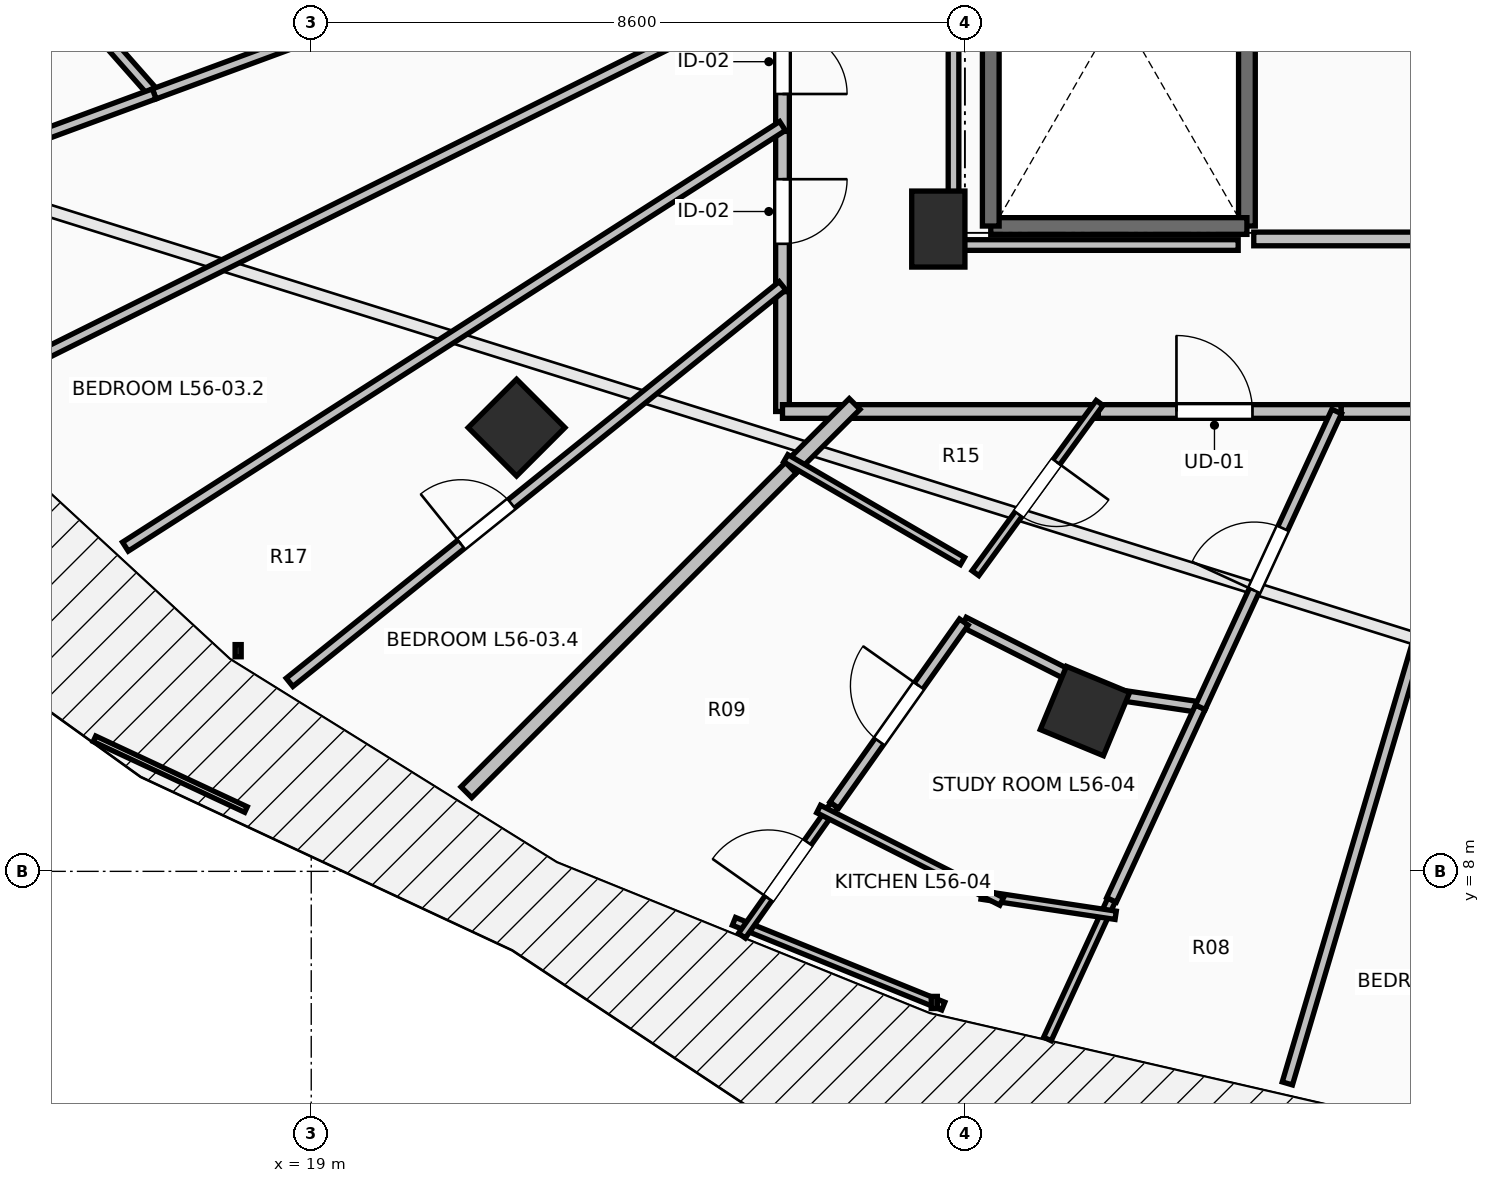
"""IFC4 building model, lengths in metres.
Left out: names, types, materials, properties, quantities, classifications, styles, units other than length and angle.
Written with IfcOpenShell. Run it as: python <this file> out.ifc"""

import sys

from ifc_helpers import new_model, si_unit, direction, frame, frame_2d, origin, origin_2d, place, context, subcontext, project, spatial, rectangle, extrude, element, fill, save


model = new_model("IFC4")
c1 = context("Model", 3, precision=1e-05, world=origin(), true_north=direction((0.0, 1.0)))
c2 = subcontext(c1, "Body", "Model", "MODEL_VIEW")
j1 = project(units=[si_unit("LENGTHUNIT", "METRE"), si_unit("PLANEANGLEUNIT", "RADIAN")], contexts=[c1])
p1 = place(None, origin())
s1 = spatial("IfcSite", under=j1, at=p1, CompositionType="ELEMENT")
p2 = place(p1, origin())
s2 = spatial("IfcBuilding", under=s1, at=p2, CompositionType="ELEMENT")
p3 = place(p2, frame((0.0, 0.0, 207.2)))
s3 = spatial("IfcBuildingStorey", under=s2, at=p3, CompositionType="ELEMENT", Elevation=207.2)
for number, where, z_axis, x_axis in (
    (1, (21.701, 13.838, 0.0), (0.0, 0.0, 1.0), (-0.707, -0.707, 0.0)),
    (2, (29.179, 10.109, 0.0), (0.0, 0.0, 1.0), (-0.383, -0.924, 0.0)),
):
    element("IfcColumn", number, at=place(p3, frame(where, z_axis=z_axis, x_axis=x_axis)), inside=s3, PredefinedType="COLUMN", context=c2, shape_type="SweptSolid", body=[
        extrude(rectangle(XDim=0.9, YDim=0.9, at=origin_2d()), origin(), (0.0, 0.0, 1.0), 3.55),
    ])
p4 = place(p3, frame((27.25, 16.45, 0.0), z_axis=(0.0, 0.0, 1.0), x_axis=(1.0, 0.0, 0.0)))
e3 = element("IfcColumn", 3, at=p4, inside=s3, PredefinedType="PILASTER", context=c2, shape_type="SweptSolid", body=[
    extrude(rectangle(XDim=0.7, YDim=1.0, at=origin_2d()), origin(), (0.0, 0.0, 1.0), 3.55),
])
p5 = place(p3, frame((31.31, 23.91, 0.0), z_axis=(0.0, 0.0, 1.0), x_axis=(0.0, -1.0, 0.0)))
e4 = element("IfcWall", 4, at=p5, inside=s3, PredefinedType="SOLIDWALL", context=c2, shape_type="SweptSolid", body=[
    extrude(rectangle(XDim=7.42, YDim=0.22, at=frame_2d((3.71, 0.0))), origin(), (0.0, 0.0, 1.0), 3.29),
])
p6 = place(p3, frame((31.31, 16.49, 0.0), z_axis=(0.0, 0.0, 1.0), x_axis=(-1.0, 0.0, 0.0)))
e5 = element("IfcWall", 5, at=p6, inside=s3, PredefinedType="SOLIDWALL", context=c2, shape_type="SweptSolid", body=[
    extrude(rectangle(XDim=3.37, YDim=0.22, at=frame_2d((1.685, 0.0))), origin(), (0.0, 0.0, 1.0), 3.29),
])
p7 = place(p3, frame((27.94, 16.49, 0.0), z_axis=(0.0, 0.0, 1.0), x_axis=(0.0, 1.0, 0.0)))
e6 = element("IfcWall", 6, at=p7, inside=s3, PredefinedType="SOLIDWALL", context=c2, shape_type="SweptSolid", body=[
    extrude(rectangle(XDim=7.42, YDim=0.22, at=frame_2d((3.71, 0.0))), origin(), (0.0, 0.0, 1.0), 3.29),
])
p8 = place(p3, frame((31.4, 16.32, 0.0), z_axis=(0.0, 0.0, 1.0), x_axis=(1.0, 0.0, 0.0)))
e7 = element("IfcWall", 7, at=p8, inside=s3, PredefinedType="PARTITIONING", context=c2, shape_type="SweptSolid", body=[
    extrude(rectangle(XDim=7.4, YDim=0.18, at=frame_2d((3.7, 0.0))), origin(), (0.0, 0.0, 1.0), 3.29),
])
p9 = place(p8, frame((3.275, 0.0, 0.0)))
e8 = element("IfcOpeningElement", 8, at=p9, cuts=e7, PredefinedType="OPENING", context=c2, shape_type="SweptSolid", body=[
    extrude(rectangle(XDim=0.85, YDim=2.1, at=frame_2d((0.425, 1.05))), frame((0.0, 0.105, 0.0), z_axis=(0.0, -1.0, 0.0), x_axis=(1.0, 0.0, 0.0)), (0.0, 0.0, 1.0), 0.21),
])
p10 = place(p3, frame((25.2, 19.569, 0.0), z_axis=(0.0, 0.0, 1.0), x_axis=(0.0, -1.0, 0.0)))
e9 = element("IfcWall", 9, at=p10, inside=s3, PredefinedType="PARTITIONING", context=c2, shape_type="SweptSolid", body=[
    extrude(rectangle(XDim=1.834, YDim=0.18, at=frame_2d((0.917, 0.0))), origin(), (0.0, 0.0, 1.0), 3.29),
])
p11 = place(p10, frame((0.492, 0.0, 0.0)))
e10 = element("IfcOpeningElement", 10, at=p11, cuts=e9, PredefinedType="OPENING", context=c2, shape_type="SweptSolid", body=[
    extrude(rectangle(XDim=0.85, YDim=2.1, at=frame_2d((0.425, 1.05))), frame((0.0, 0.105, 0.0), z_axis=(0.0, -1.0, 0.0), x_axis=(1.0, 0.0, 0.0)), (0.0, 0.0, 1.0), 0.21),
])
p12 = place(p3, frame((25.2, 17.735, 0.0), z_axis=(0.0, 0.0, 1.0), x_axis=(0.0, -1.0, 0.0)))
e11 = element("IfcWall", 11, at=p12, inside=s3, PredefinedType="PARTITIONING", context=c2, shape_type="SweptSolid", body=[
    extrude(rectangle(XDim=2.108, YDim=0.18, at=frame_2d((1.054, 0.0))), origin(), (0.0, 0.0, 1.0), 2.482),
])
p13 = place(p12, frame((0.629, 0.0, 0.0)))
e12 = element("IfcOpeningElement", 12, at=p13, cuts=e11, PredefinedType="OPENING", context=c2, shape_type="SweptSolid", body=[
    extrude(rectangle(XDim=0.85, YDim=2.1, at=frame_2d((0.425, 1.05))), frame((0.0, 0.105, 0.0), z_axis=(0.0, -1.0, 0.0), x_axis=(1.0, 0.0, 0.0)), (0.0, 0.0, 1.0), 0.21),
])
p14 = place(p3, frame((25.2, 15.627, 0.0), z_axis=(0.0, 0.0, 1.0), x_axis=(0.0, -1.0, 0.0)))
e13 = element("IfcWall", 13, at=p14, inside=s3, PredefinedType="PARTITIONING", context=c2, shape_type="SweptSolid", body=[
    extrude(rectangle(XDim=1.577, YDim=0.18, at=frame_2d((0.789, 0.0))), origin(), (0.0, 0.0, 1.0), 2.482),
])
p15 = place(p3, frame((25.2, 14.05, 0.0), z_axis=(0.0, 0.0, 1.0), x_axis=(1.0, 0.0, 0.0)))
e14 = element("IfcWall", 14, at=p15, inside=s3, PredefinedType="PARTITIONING", context=c2, shape_type="SweptSolid", body=[
    extrude(rectangle(XDim=0.91, YDim=0.18, at=frame_2d((0.455, 0.0))), origin(), (0.0, 0.0, 1.0), 3.022),
])
p16 = place(p3, frame((29.215, 14.05, 0.0), z_axis=(0.0, 0.0, 1.0), x_axis=(1.0, 0.0, 0.0)))
e15 = element("IfcWall", 15, at=p16, inside=s3, PredefinedType="PARTITIONING", context=c2, shape_type="SweptSolid", body=[
    extrude(rectangle(XDim=3.336, YDim=0.18, at=frame_2d((1.668, 0.0))), origin(), (0.0, 0.0, 1.0), 2.936),
])
p17 = place(p16, frame((1.168, 0.0, 0.0)))
e16 = element("IfcOpeningElement", 16, at=p17, cuts=e15, PredefinedType="OPENING", context=c2, shape_type="SweptSolid", body=[
    extrude(rectangle(XDim=1.0, YDim=2.15, at=frame_2d((0.5, 1.075))), frame((0.0, 0.105, 0.0), z_axis=(0.0, -1.0, 0.0), x_axis=(1.0, 0.0, 0.0)), (0.0, 0.0, 1.0), 0.21),
])
p18 = place(p3, frame((25.97, 14.05, 0.0), z_axis=(0.0, 0.0, 1.0), x_axis=(1.0, 0.0, 0.0)))
e17 = element("IfcWall", 17, at=p18, inside=s3, PredefinedType="PARTITIONING", context=c2, shape_type="SweptSolid", body=[
    extrude(rectangle(XDim=3.385, YDim=0.18, at=frame_2d((1.692, 0.0))), origin(), (0.0, 0.0, 1.0), 2.482),
])
p19 = place(p3, frame((32.551, 14.05, 0.0), z_axis=(0.0, 0.0, 1.0), x_axis=(1.0, 0.0, 0.0)))
e18 = element("IfcWall", 18, at=p19, inside=s3, PredefinedType="PARTITIONING", context=c2, shape_type="SweptSolid", body=[
    extrude(rectangle(XDim=1.969, YDim=0.18, at=frame_2d((0.984, 0.0))), origin(), (0.0, 0.0, 1.0), 2.936),
])
p20 = place(p3, frame((16.123, 19.147, 0.0), z_axis=(0.0, 0.0, 1.0), x_axis=(0.66171386468, -0.749756467988, 0.0)))
e19 = element("IfcWall", 19, at=p20, inside=s3, PredefinedType="PARTITIONING", context=c2, shape_type="SweptSolid", body=[
    extrude(rectangle(XDim=1.226, YDim=0.14, at=frame_2d((0.613, 0.0))), origin(), (0.0, 0.0, 1.0), 3.29),
])
p21 = place(p3, frame((16.934, 18.228, 0.0), z_axis=(0.0, 0.0, 1.0), x_axis=(0.938168899516, 0.34617786755, 0.0)))
e20 = element("IfcWall", 20, at=p21, inside=s3, PredefinedType="PARTITIONING", context=c2, shape_type="SweptSolid", body=[
    extrude(rectangle(XDim=8.811, YDim=0.14, at=frame_2d((4.405, 0.0))), origin(), (0.0, 0.0, 1.0), 2.482),
])
p22 = place(p21, frame((3.955, 0.0, 0.0)))
e21 = element("IfcOpeningElement", 21, at=p22, cuts=e20, PredefinedType="OPENING", context=c2, shape_type="SweptSolid", body=[
    extrude(rectangle(XDim=0.9, YDim=2.1, at=frame_2d((0.45, 1.05))), frame((0.0, 0.085, 0.0), z_axis=(0.0, -1.0, 0.0), x_axis=(1.0, 0.0, 0.0)), (0.0, 0.0, 1.0), 0.17),
])
p23 = place(p3, frame((14.788, 17.436, 0.0), z_axis=(0.0, 0.0, 1.0), x_axis=(0.938171690747, 0.346170303003, 0.0)))
e22 = element("IfcWall", 22, at=p23, inside=s3, PredefinedType="PARTITIONING", context=c2, shape_type="SweptSolid", body=[
    extrude(rectangle(XDim=2.287, YDim=0.14, at=frame_2d((1.144, 0.0))), origin(), (0.0, 0.0, 1.0), 3.29),
])
p24 = place(p3, frame((14.428, 14.28, 0.0), z_axis=(0.0, 0.0, 1.0), x_axis=(0.895423439435, 0.44521552546, 0.0)))
e23 = element("IfcWall", 23, at=p24, inside=s3, PredefinedType="PARTITIONING", context=c2, shape_type="SweptSolid", body=[
    extrude(rectangle(XDim=12.03, YDim=0.14, at=frame_2d((6.015, 0.0))), origin(), (0.0, 0.0, 1.0), 2.482),
])
p25 = place(p3, frame((16.555, 12.272, 0.0), z_axis=(0.0, 0.0, 1.0), x_axis=(0.842221721565, 0.539131312135, 0.0)))
e24 = element("IfcWall", 24, at=p25, inside=s3, PredefinedType="PARTITIONING", context=c2, shape_type="SweptSolid", body=[
    extrude(rectangle(XDim=10.265, YDim=0.14, at=frame_2d((5.132, 0.0))), origin(), (0.0, 0.0, 1.0), 2.482),
])
p26 = place(p3, frame((18.715, 10.487, 0.0), z_axis=(0.0, 0.0, 1.0), x_axis=(0.779157389419, 0.626828335762, 0.0)))
e25 = element("IfcWall", 25, at=p26, inside=s3, PredefinedType="PARTITIONING", context=c2, shape_type="SweptSolid", body=[
    extrude(rectangle(XDim=8.323, YDim=0.14, at=frame_2d((4.162, 0.0))), origin(), (0.0, 0.0, 1.0), 2.482),
])
p27 = place(p26, frame((2.896, 0.0, 0.0)))
e26 = element("IfcOpeningElement", 26, at=p27, cuts=e25, PredefinedType="OPENING", context=c2, shape_type="SweptSolid", body=[
    extrude(rectangle(XDim=0.85, YDim=2.1, at=frame_2d((0.425, 1.05))), frame((0.0, 0.085, 0.0), z_axis=(0.0, -1.0, 0.0), x_axis=(1.0, 0.0, 0.0)), (0.0, 0.0, 1.0), 0.17),
])
p28 = place(p3, frame((21.041, 9.041, 0.0), z_axis=(0.0, 0.0, 1.0), x_axis=(0.707106781187, 0.707106781187, 0.0)))
e27 = element("IfcWall", 27, at=p28, inside=s3, PredefinedType="PARTITIONING", context=c2, shape_type="SweptSolid", body=[
    extrude(rectangle(XDim=6.176, YDim=0.2, at=frame_2d((3.088, 0.0))), origin(), (0.0, 0.0, 1.0), 2.824),
])
p29 = place(p3, frame((25.309, 13.309, 0.0), z_axis=(0.0, 0.0, 1.0), x_axis=(0.707106781187, 0.707106781187, 0.0)))
e28 = element("IfcWall", 28, at=p29, inside=s3, PredefinedType="PARTITIONING", context=c2, shape_type="SweptSolid", body=[
    extrude(rectangle(XDim=1.188, YDim=0.2, at=frame_2d((0.594, 0.0))), origin(), (0.0, 0.0, 1.0), 3.022),
])
p30 = place(p3, frame((29.372, 14.163, 0.0), z_axis=(0.0, 0.0, 1.0), x_axis=(-0.589066743954, -0.808084383693, 0.0)))
e29 = element("IfcWall", 29, at=p30, inside=s3, PredefinedType="PARTITIONING", context=c2, shape_type="SweptSolid", body=[
    extrude(rectangle(XDim=2.772, YDim=0.11, at=frame_2d((1.386, 0.0))), origin(), (0.0, 0.0, 1.0), 2.482),
])
p31 = place(p30, frame((0.961, 0.0, 0.0)))
e30 = element("IfcOpeningElement", 30, at=p31, cuts=e29, PredefinedType="OPENING", context=c2, shape_type="SweptSolid", body=[
    extrude(rectangle(XDim=0.85, YDim=2.1, at=frame_2d((0.425, 1.05))), frame((0.0, 0.07, 0.0), z_axis=(0.0, -1.0, 0.0), x_axis=(1.0, 0.0, 0.0)), (0.0, 0.0, 1.0), 0.14),
])
p32 = place(p3, frame((27.568, 12.083, 0.0), z_axis=(0.0, 0.0, 1.0), x_axis=(-0.864515441931, 0.502606258082, 0.0)))
e31 = element("IfcWall", 31, at=p32, inside=s3, PredefinedType="PARTITIONING", context=c2, shape_type="SweptSolid", body=[
    extrude(rectangle(XDim=2.69, YDim=0.11, at=frame_2d((1.345, 0.0))), origin(), (0.0, 0.0, 1.0), 3.29),
])
p33 = place(p3, frame((29.529, 7.624, 0.0), z_axis=(0.0, 0.0, 1.0), x_axis=(-0.418673802252, -0.908136689771, 0.0)))
e32 = element("IfcWall", 32, at=p33, inside=s3, PredefinedType="PARTITIONING", context=c2, shape_type="SweptSolid", body=[
    extrude(rectangle(XDim=2.014, YDim=0.11, at=frame_2d((1.007, 0.0))), origin(), (0.0, 0.0, 1.0), 3.29),
])
p34 = place(p3, frame((24.561, 7.343, 0.0), z_axis=(0.0, 0.0, 1.0), x_axis=(0.926858319785, -0.375411314487, 0.0)))
e33 = element("IfcWall", 33, at=p34, inside=s3, PredefinedType="PARTITIONING", context=c2, shape_type="SweptSolid", body=[
    extrude(rectangle(XDim=2.971, YDim=0.11, at=frame_2d((1.485, 0.0))), origin(), (0.0, 0.0, 1.0), 3.29),
])
p35 = place(p3, frame((24.666, 7.154, 0.0), z_axis=(0.0, 0.0, 1.0), x_axis=(0.577389248155, 0.816469017241, 0.0)))
e34 = element("IfcWall", 34, at=p35, inside=s3, PredefinedType="PARTITIONING", context=c2, shape_type="SweptSolid", body=[
    extrude(rectangle(XDim=2.104, YDim=0.11, at=frame_2d((1.052, 0.0))), origin(), (0.0, 0.0, 1.0), 3.29),
])
p36 = place(p35, frame((0.602, 0.0, 0.0)))
e35 = element("IfcOpeningElement", 35, at=p36, cuts=e34, PredefinedType="OPENING", context=c2, shape_type="SweptSolid", body=[
    extrude(rectangle(XDim=0.9, YDim=2.1, at=frame_2d((0.45, 1.05))), frame((0.0, 0.07, 0.0), z_axis=(0.0, -1.0, 0.0), x_axis=(1.0, 0.0, 0.0)), (0.0, 0.0, 1.0), 0.14),
])
p37 = place(p3, frame((27.586, 11.28, 0.0), z_axis=(0.0, 0.0, 1.0), x_axis=(0.89250267167, -0.451042105643, 0.0)))
e36 = element("IfcWall", 36, at=p37, inside=s3, PredefinedType="PARTITIONING", context=c2, shape_type="SweptSolid", body=[
    extrude(rectangle(XDim=2.064, YDim=0.14, at=frame_2d((1.032, 0.0))), origin(), (0.0, 0.0, 1.0), 2.482),
])
p38 = place(p3, frame((29.428, 10.349, 0.0), z_axis=(0.0, 0.0, 1.0), x_axis=(0.988955881685, -0.148210202353, 0.0)))
e37 = element("IfcWall", 37, at=p38, inside=s3, PredefinedType="PARTITIONING", context=c2, shape_type="SweptSolid", body=[
    extrude(rectangle(XDim=1.283, YDim=0.14, at=frame_2d((0.642, 0.0))), origin(), (0.0, 0.0, 1.0), 3.29),
])
p39 = place(p3, frame((30.697, 10.159, 0.0), z_axis=(0.0, 0.0, 1.0), x_axis=(-0.41861439522, -0.908164075547, 0.0)))
e38 = element("IfcWall", 38, at=p39, inside=s3, PredefinedType="PARTITIONING", context=c2, shape_type="SweptSolid", body=[
    extrude(rectangle(XDim=2.791, YDim=0.14, at=frame_2d((1.396, 0.0))), origin(), (0.0, 0.0, 1.0), 2.824),
])
p40 = place(p3, frame((25.881, 8.871, 0.0), z_axis=(0.0, 0.0, 1.0), x_axis=(0.577734997211, 0.816224401128, 0.0)))
e39 = element("IfcWall", 39, at=p40, inside=s3, PredefinedType="PARTITIONING", context=c2, shape_type="SweptSolid", body=[
    extrude(rectangle(XDim=2.951, YDim=0.14, at=frame_2d((1.476, 0.0))), origin(), (0.0, 0.0, 1.0), 2.824),
])
p41 = place(p40, frame((1.026, 0.0, 0.0)))
e40 = element("IfcOpeningElement", 40, at=p41, cuts=e39, PredefinedType="OPENING", context=c2, shape_type="SweptSolid", body=[
    extrude(rectangle(XDim=0.9, YDim=2.1, at=frame_2d((0.45, 1.05))), frame((0.0, 0.085, 0.0), z_axis=(0.0, -1.0, 0.0), x_axis=(1.0, 0.0, 0.0)), (0.0, 0.0, 1.0), 0.17),
])
p42 = place(p3, frame((30.697, 10.159, 0.0), z_axis=(0.0, 0.0, 1.0), x_axis=(0.418635364892, 0.908154409372, 0.0)))
e41 = element("IfcWall", 41, at=p42, inside=s3, PredefinedType="PARTITIONING", context=c2, shape_type="SweptSolid", body=[
    extrude(rectangle(XDim=4.285, YDim=0.14, at=frame_2d((2.142, 0.0))), origin(), (0.0, 0.0, 1.0), 2.936),
])
p43 = place(p42, frame((1.692, 0.0, 0.0)))
e42 = element("IfcOpeningElement", 42, at=p43, cuts=e41, PredefinedType="OPENING", context=c2, shape_type="SweptSolid", body=[
    extrude(rectangle(XDim=0.9, YDim=2.1, at=frame_2d((0.45, 1.05))), frame((0.0, 0.085, 0.0), z_axis=(0.0, -1.0, 0.0), x_axis=(1.0, 0.0, 0.0)), (0.0, 0.0, 1.0), 0.17),
])
p44 = place(p3, frame((29.583, 7.422, 0.0), z_axis=(0.0, 0.0, 1.0), x_axis=(-0.988830695744, 0.149043131857, 0.0)))
e43 = element("IfcWall", 43, at=p44, inside=s3, PredefinedType="PARTITIONING", context=c2, shape_type="SweptSolid", body=[
    extrude(rectangle(XDim=1.784, YDim=0.11, at=frame_2d((0.892, 0.0))), origin(), (0.0, 0.0, 1.0), 3.29),
])
p45 = place(p3, frame((28.083, 7.604, 0.0), z_axis=(0.0, 0.0, 1.0), x_axis=(-0.892628057427, 0.450793911999, 0.0)))
e44 = element("IfcWall", 44, at=p45, inside=s3, PredefinedType="PARTITIONING", context=c2, shape_type="SweptSolid", body=[
    extrude(rectangle(XDim=2.698, YDim=0.11, at=frame_2d((1.349, 0.0))), origin(), (0.0, 0.0, 1.0), 3.29),
])
p46 = place(p3, frame((31.842, 5.21, 0.0), z_axis=(0.0, 0.0, 1.0), x_axis=(0.283952183478, 0.958838441813, 0.0)))
e45 = element("IfcWall", 45, at=p46, inside=s3, PredefinedType="PARTITIONING", context=c2, shape_type="SweptSolid", body=[
    extrude(rectangle(XDim=9.219, YDim=0.14, at=frame_2d((4.61, 0.0))), origin(), (0.0, 0.0, 1.0), 2.824),
])
p47 = place(p3, frame((27.45, 23.754, 0.0), z_axis=(0.0, 0.0, 1.0), x_axis=(0.0, -1.0, 0.0)))
e46 = element("IfcWall", 46, at=p47, inside=s3, PredefinedType="PARTITIONING", context=c2, shape_type="SweptSolid", body=[
    extrude(rectangle(XDim=7.514, YDim=0.14, at=frame_2d((3.757, 0.0))), origin(), (0.0, 0.0, 1.0), 2.482),
])
p48 = place(p3, frame((27.45, 16.24, 0.0), z_axis=(0.0, 0.0, 1.0), x_axis=(1.0, 0.0, 0.0)))
e47 = element("IfcWall", 47, at=p48, inside=s3, PredefinedType="PARTITIONING", context=c2, shape_type="SweptSolid", body=[
    extrude(rectangle(XDim=3.745, YDim=0.14, at=frame_2d((1.873, 0.0))), origin(), (0.0, 0.0, 1.0), 2.482),
])
p49 = place(p17, origin())
e48 = element("IfcDoor", 48, at=p49, inside=s3, OperationType="SINGLE_SWING_LEFT", PredefinedType="DOOR", context=c2, shape_type="SweptSolid", body=[
    extrude(rectangle(XDim=1.0, YDim=2.15, at=frame_2d((0.5, 1.075))), frame((0.0, 0.025, 0.0), z_axis=(0.0, -1.0, 0.0), x_axis=(1.0, 0.0, 0.0)), (0.0, 0.0, 1.0), 0.05),
])
fill(e16, e48)
p50 = place(p31, origin())
e49 = element("IfcDoor", 49, at=p50, inside=s3, OperationType="SINGLE_SWING_LEFT", PredefinedType="DOOR", context=c2, shape_type="SweptSolid", body=[
    extrude(rectangle(XDim=0.85, YDim=2.1, at=frame_2d((0.425, 1.05))), frame((0.0, 0.025, 0.0), z_axis=(0.0, -1.0, 0.0), x_axis=(1.0, 0.0, 0.0)), (0.0, 0.0, 1.0), 0.05),
])
fill(e30, e49)
p51 = place(p36, origin())
e50 = element("IfcDoor", 50, at=p51, inside=s3, OperationType="SINGLE_SWING_LEFT", PredefinedType="DOOR", context=c2, shape_type="SweptSolid", body=[
    extrude(rectangle(XDim=0.9, YDim=2.1, at=frame_2d((0.45, 1.05))), frame((0.0, 0.025, 0.0), z_axis=(0.0, -1.0, 0.0), x_axis=(1.0, 0.0, 0.0)), (0.0, 0.0, 1.0), 0.05),
])
fill(e35, e50)
p52 = place(p41, origin())
e51 = element("IfcDoor", 51, at=p52, inside=s3, OperationType="SINGLE_SWING_RIGHT", PredefinedType="DOOR", context=c2, shape_type="SweptSolid", body=[
    extrude(rectangle(XDim=0.9, YDim=2.1, at=frame_2d((0.45, 1.05))), frame((0.0, 0.025, 0.0), z_axis=(0.0, -1.0, 0.0), x_axis=(1.0, 0.0, 0.0)), (0.0, 0.0, 1.0), 0.05),
])
fill(e40, e51)
p53 = place(p43, origin())
e52 = element("IfcDoor", 52, at=p53, inside=s3, OperationType="SINGLE_SWING_LEFT", PredefinedType="DOOR", context=c2, shape_type="SweptSolid", body=[
    extrude(rectangle(XDim=0.9, YDim=2.1, at=frame_2d((0.45, 1.05))), frame((0.0, 0.025, 0.0), z_axis=(0.0, -1.0, 0.0), x_axis=(1.0, 0.0, 0.0)), (0.0, 0.0, 1.0), 0.05),
])
fill(e42, e52)
p54 = place(p11, origin())
e53 = element("IfcDoor", 53, at=p54, inside=s3, OperationType="SINGLE_SWING_RIGHT", PredefinedType="DOOR", context=c2, shape_type="SweptSolid", body=[
    extrude(rectangle(XDim=0.85, YDim=2.1, at=frame_2d((0.425, 1.05))), frame((0.0, 0.025, 0.0), z_axis=(0.0, -1.0, 0.0), x_axis=(1.0, 0.0, 0.0)), (0.0, 0.0, 1.0), 0.05),
])
fill(e10, e53)
p55 = place(p13, origin())
e54 = element("IfcDoor", 54, at=p55, inside=s3, OperationType="SINGLE_SWING_LEFT", PredefinedType="DOOR", context=c2, shape_type="SweptSolid", body=[
    extrude(rectangle(XDim=0.85, YDim=2.1, at=frame_2d((0.425, 1.05))), frame((0.0, 0.025, 0.0), z_axis=(0.0, -1.0, 0.0), x_axis=(1.0, 0.0, 0.0)), (0.0, 0.0, 1.0), 0.05),
])
fill(e12, e54)
p56 = place(p27, origin())
e55 = element("IfcDoor", 55, at=p56, inside=s3, OperationType="SINGLE_SWING_LEFT", PredefinedType="DOOR", context=c2, shape_type="SweptSolid", body=[
    extrude(rectangle(XDim=0.85, YDim=2.1, at=frame_2d((0.425, 1.05))), frame((0.0, 0.025, 0.0), z_axis=(0.0, -1.0, 0.0), x_axis=(1.0, 0.0, 0.0)), (0.0, 0.0, 1.0), 0.05),
])
fill(e26, e55)
save(model, sys.argv[1])
